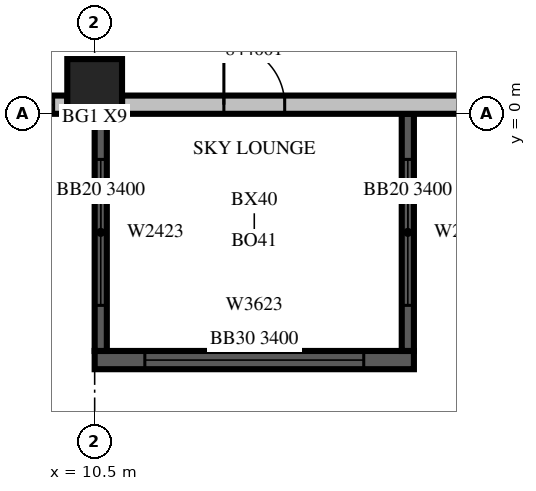
"""IFC4 building model, lengths in metres.
Left out: names, types, materials, properties, quantities, classifications, styles, units other than length and angle.
Written with IfcOpenShell. Run it as: python <this file> out.ifc"""

import sys

from ifc_helpers import new_model, si_unit, direction, frame, frame_2d, origin, origin_2d, place, context, subcontext, project, spatial, rectangle, extrude, source, transform, mapped, element, fill, save


model = new_model("IFC4")
c1 = context("Model", 3, precision=1e-05, world=origin(), true_north=direction((0.0, 1.0)))
c2 = subcontext(c1, "Body", "Model", "MODEL_VIEW")
j1 = project(units=[si_unit("LENGTHUNIT", "METRE"), si_unit("PLANEANGLEUNIT", "RADIAN")], contexts=[c1])
p1 = place(None, origin())
s1 = spatial("IfcSite", under=j1, at=p1, CompositionType="ELEMENT")
p2 = place(p1, origin())
s2 = spatial("IfcBuilding", under=s1, at=p2, CompositionType="ELEMENT")
p3 = place(p2, frame((0.0, 0.0, 200.6)))
s3 = spatial("IfcBuildingStorey", under=s2, at=p3, CompositionType="ELEMENT", Elevation=200.6)
m1 = source(origin(), c2, "Body", "SweptSolid", [
    extrude(rectangle(XDim=0.9, YDim=0.9, at=origin_2d()), origin(), (0.0, 0.0, 1.0), 3.8),
])
p4 = place(p3, frame((10.5, 0.45, 0.0), z_axis=(0.0, 0.0, 1.0), x_axis=(1.0, 0.0, 0.0)))
e1 = element("IfcColumn", 1, at=p4, inside=s3, PredefinedType="COLUMN", context=c2, shape_type="MappedRepresentation", body=[
    mapped(m1, transform((0.0, 0.0, 0.0), scale=1.0)),
])
m2 = source(origin(), c2, "Body", "SweptSolid", [
    extrude(rectangle(XDim=5.25, YDim=0.3, at=frame_2d((2.625, 0.0))), origin(), (0.0, 0.0, 1.0), 3.4),
])
p5 = place(p3, frame((10.5, -4.05, 0.0), z_axis=(0.0, 0.0, 1.0), x_axis=(1.0, 0.0, 0.0)))
e2 = element("IfcWall", 2, at=p5, inside=s3, PredefinedType="SOLIDWALL", context=c2, shape_type="MappedRepresentation", body=[
    mapped(m2, transform((0.0, 0.0, 0.0), scale=1.0)),
])
m3 = source(origin(), c2, "Body", "SweptSolid", [
    extrude(rectangle(XDim=3.6, YDim=2.3, at=frame_2d((1.8, 1.15))), frame((0.0, 0.16, 0.0), z_axis=(0.0, -1.0, 0.0), x_axis=(1.0, 0.0, 0.0)), (0.0, 0.0, 1.0), 0.32),
])
p6 = place(p5, frame((0.825, 0.0, 0.6)))
e3 = element("IfcOpeningElement", 3, at=p6, cuts=e2, PredefinedType="OPENING", context=c2, shape_type="MappedRepresentation", body=[
    mapped(m3, transform((0.0, 0.0, 0.0), scale=1.0)),
])
m4 = source(origin(), c2, "Body", "SweptSolid", [
    extrude(rectangle(XDim=3.9, YDim=0.2, at=frame_2d((1.95, 0.0))), origin(), (0.0, 0.0, 1.0), 3.4),
])
p7 = place(p3, frame((10.6, 0.0, 0.0), z_axis=(0.0, 0.0, 1.0), x_axis=(0.0, -1.0, 0.0)))
e4 = element("IfcWall", 4, at=p7, inside=s3, PredefinedType="SOLIDWALL", context=c2, shape_type="MappedRepresentation", body=[
    mapped(m4, transform((0.0, 0.0, 0.0), scale=1.0)),
])
m5 = source(origin(), c2, "Body", "SweptSolid", [
    extrude(rectangle(XDim=2.4, YDim=2.3, at=frame_2d((1.2, 1.15))), frame((0.0, 0.11, 0.0), z_axis=(0.0, -1.0, 0.0), x_axis=(1.0, 0.0, 0.0)), (0.0, 0.0, 1.0), 0.22),
])
p8 = place(p7, frame((0.75, 0.0, 0.6)))
e5 = element("IfcOpeningElement", 5, at=p8, cuts=e4, PredefinedType="OPENING", context=c2, shape_type="MappedRepresentation", body=[
    mapped(m5, transform((0.0, 0.0, 0.0), scale=1.0)),
])
p9 = place(p3, frame((15.65, 0.0, 0.0), z_axis=(0.0, 0.0, 1.0), x_axis=(0.0, -1.0, 0.0)))
e6 = element("IfcWall", 6, at=p9, inside=s3, PredefinedType="SOLIDWALL", context=c2, shape_type="MappedRepresentation", body=[
    mapped(m4, transform((0.0, 0.0, 0.0), scale=1.0)),
])
p10 = place(p9, frame((0.75, 0.0, 0.6)))
e7 = element("IfcOpeningElement", 7, at=p10, cuts=e6, PredefinedType="OPENING", context=c2, shape_type="MappedRepresentation", body=[
    mapped(m5, transform((0.0, 0.0, 0.0), scale=1.0)),
])
m6 = source(origin(), c2, "Body", "SweptSolid", [
    extrude(rectangle(XDim=2.7, YDim=0.3, at=frame_2d((1.35, 0.0))), origin(), (0.0, 0.0, 1.0), 3.4),
])
p11 = place(p3, frame((7.35, 0.15, 0.0), z_axis=(0.0, 0.0, 1.0), x_axis=(1.0, 0.0, 0.0)))
e8 = element("IfcWall", 8, at=p11, inside=s3, PredefinedType="STANDARD", context=c2, shape_type="MappedRepresentation", body=[
    mapped(m6, transform((0.0, 0.0, 0.0), scale=1.0)),
])
m7 = source(origin(), c2, "Body", "SweptSolid", [
    extrude(rectangle(XDim=1.8, YDim=2.3, at=frame_2d((0.9, 1.15))), frame((0.0, 0.16, 0.0), z_axis=(0.0, -1.0, 0.0), x_axis=(1.0, 0.0, 0.0)), (0.0, 0.0, 1.0), 0.32),
])
p12 = place(p11, frame((0.675, 0.0, 0.6)))
e9 = element("IfcOpeningElement", 9, at=p12, cuts=e8, PredefinedType="OPENING", context=c2, shape_type="MappedRepresentation", body=[
    mapped(m7, transform((0.0, 0.0, 0.0), scale=1.0)),
])
m8 = source(origin(), c2, "Body", "SweptSolid", [
    extrude(rectangle(XDim=9.6, YDim=0.3, at=frame_2d((4.8, 0.0))), origin(), (0.0, 0.0, 1.0), 3.4),
])
p13 = place(p3, frame((10.95, 0.15, 0.0), z_axis=(0.0, 0.0, 1.0), x_axis=(1.0, 0.0, 0.0)))
e10 = element("IfcWall", 10, at=p13, inside=s3, PredefinedType="STANDARD", context=c2, shape_type="MappedRepresentation", body=[
    mapped(m8, transform((0.0, 0.0, 0.0), scale=1.0)),
])
p14 = place(p13, frame((5.625, 0.0, 0.6)))
e11 = element("IfcOpeningElement", 11, at=p14, cuts=e10, PredefinedType="OPENING", context=c2, shape_type="MappedRepresentation", body=[
    mapped(m3, transform((0.0, 0.0, 0.0), scale=1.0)),
])
m9 = source(origin(), c2, "Body", "SweptSolid", [
    extrude(rectangle(XDim=1.0, YDim=2.1, at=frame_2d((0.5, 1.05))), frame((0.0, 0.16, 0.0), z_axis=(0.0, -1.0, 0.0), x_axis=(1.0, 0.0, 0.0)), (0.0, 0.0, 1.0), 0.32),
])
p15 = place(p13, frame((1.675, 0.0, 0.0)))
e12 = element("IfcOpeningElement", 12, at=p15, cuts=e10, PredefinedType="OPENING", context=c2, shape_type="MappedRepresentation", body=[
    mapped(m9, transform((0.0, 0.0, 0.0), scale=1.0)),
])
m10 = source(origin(), c2, "Body", "SweptSolid", [
    extrude(rectangle(XDim=3.6, YDim=2.3, at=frame_2d((1.8, 1.15))), frame((0.0, 0.03, 0.0), z_axis=(0.0, -1.0, 0.0), x_axis=(1.0, 0.0, 0.0)), (0.0, 0.0, 1.0), 0.06),
])
p16 = place(p6, origin())
e13 = element("IfcWindow", 13, at=p16, inside=s3, PartitioningType="SINGLE_PANEL", PredefinedType="WINDOW", context=c2, shape_type="MappedRepresentation", body=[
    mapped(m10, transform((0.0, 0.0, 0.0), scale=1.0)),
])
fill(e3, e13)
m11 = source(origin(), c2, "Body", "SweptSolid", [
    extrude(rectangle(XDim=2.4, YDim=2.3, at=frame_2d((1.2, 1.15))), frame((0.0, 0.03, 0.0), z_axis=(0.0, -1.0, 0.0), x_axis=(1.0, 0.0, 0.0)), (0.0, 0.0, 1.0), 0.06),
])
p17 = place(p8, origin())
e14 = element("IfcWindow", 14, at=p17, inside=s3, PartitioningType="SINGLE_PANEL", PredefinedType="WINDOW", context=c2, shape_type="MappedRepresentation", body=[
    mapped(m11, transform((0.0, 0.0, 0.0), scale=1.0)),
])
fill(e5, e14)
p18 = place(p10, origin())
e15 = element("IfcWindow", 15, at=p18, inside=s3, PartitioningType="SINGLE_PANEL", PredefinedType="WINDOW", context=c2, shape_type="MappedRepresentation", body=[
    mapped(m11, transform((0.0, 0.0, 0.0), scale=1.0)),
])
fill(e7, e15)
m12 = source(origin(), c2, "Body", "SweptSolid", [
    extrude(rectangle(XDim=1.8, YDim=2.3, at=frame_2d((0.9, 1.15))), frame((0.0, 0.03, 0.0), z_axis=(0.0, -1.0, 0.0), x_axis=(1.0, 0.0, 0.0)), (0.0, 0.0, 1.0), 0.06),
])
p19 = place(p12, origin())
e16 = element("IfcWindow", 16, at=p19, inside=s3, PartitioningType="SINGLE_PANEL", PredefinedType="WINDOW", context=c2, shape_type="MappedRepresentation", body=[
    mapped(m12, transform((0.0, 0.0, 0.0), scale=1.0)),
])
fill(e9, e16)
m13 = source(origin(), c2, "Body", "SweptSolid", [
    extrude(rectangle(XDim=1.0, YDim=2.1, at=frame_2d((0.5, 1.05))), frame((0.0, 0.025, 0.0), z_axis=(0.0, -1.0, 0.0), x_axis=(1.0, 0.0, 0.0)), (0.0, 0.0, 1.0), 0.05),
])
p20 = place(p15, origin())
e17 = element("IfcDoor", 17, at=p20, inside=s3, OperationType="SINGLE_SWING_LEFT", PredefinedType="DOOR", context=c2, shape_type="MappedRepresentation", body=[
    mapped(m13, transform((0.0, 0.0, 0.0), scale=1.0)),
])
fill(e12, e17)
save(model, sys.argv[1])
